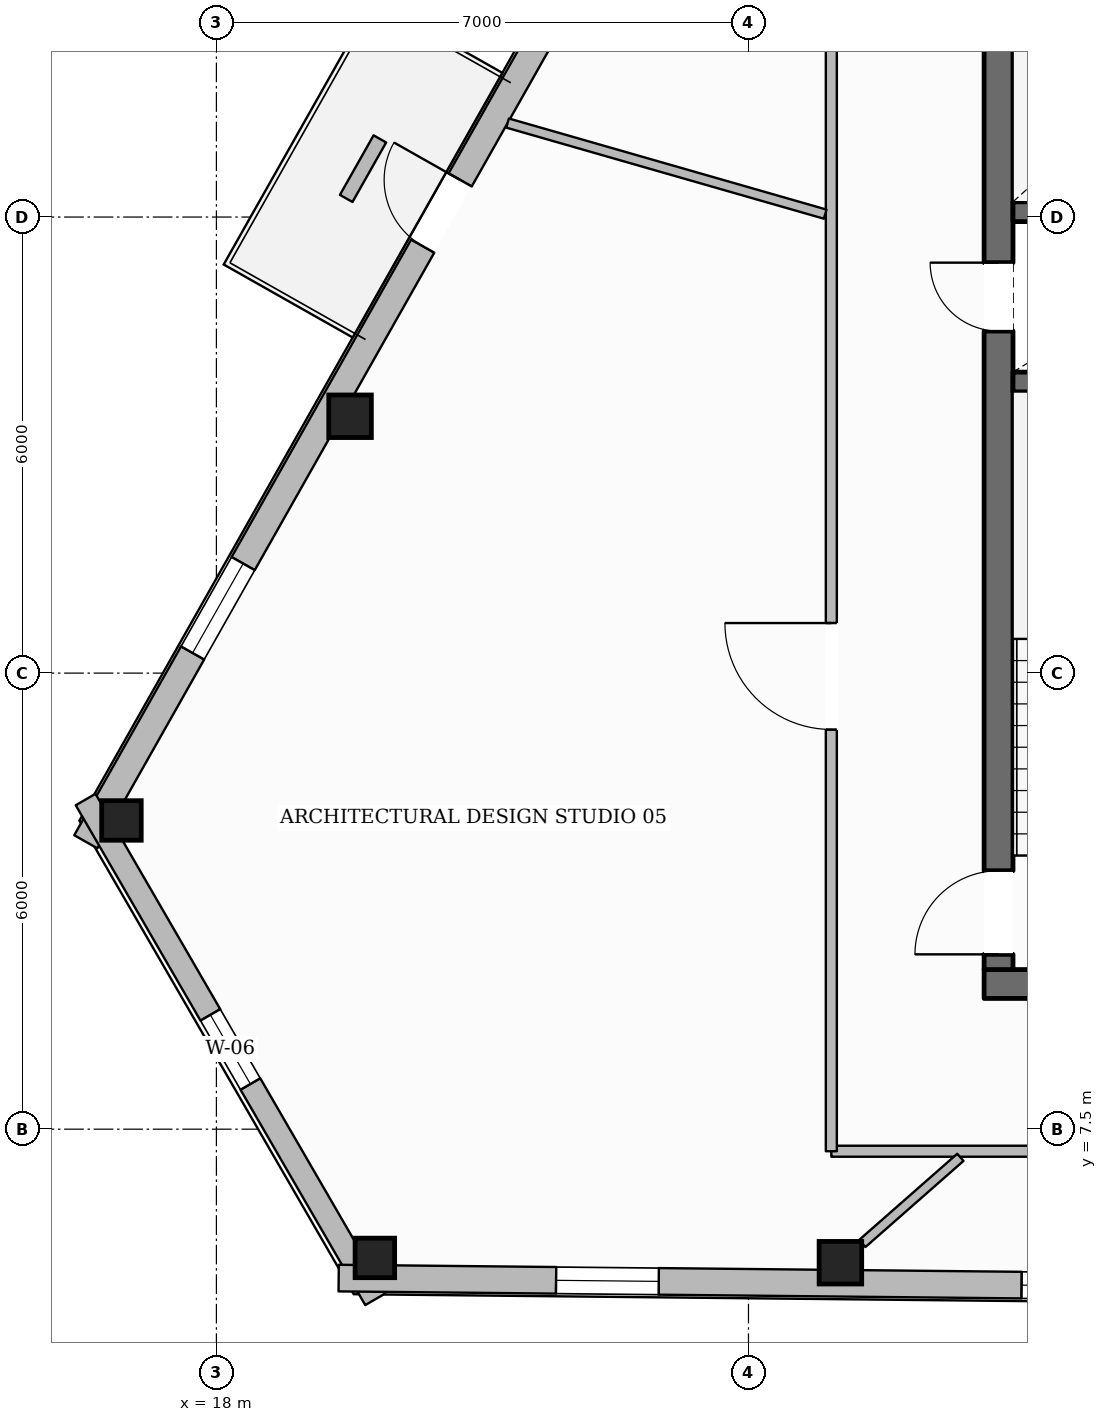
"""IFC4 building model, lengths in metres.
Left out: names, types, materials, properties, quantities, classifications, styles, units other than length and angle.
Written with IfcOpenShell. Run it as: python <this file> out.ifc"""

import sys

from ifc_helpers import new_model, si_unit, direction, frame, frame_2d, origin, origin_2d, place, context, subcontext, project, spatial, rectangle, hollow_rectangle, extrude, element, fill, save


model = new_model("IFC4")
c1 = context("Model", 3, precision=1e-05, world=origin(), true_north=direction((0.0, 1.0)))
c2 = subcontext(c1, "Body", "Model", "MODEL_VIEW")
j1 = project(units=[si_unit("LENGTHUNIT", "METRE"), si_unit("PLANEANGLEUNIT", "RADIAN")], contexts=[c1])
p1 = place(None, origin())
s1 = spatial("IfcSite", under=j1, at=p1, CompositionType="ELEMENT")
p2 = place(p1, origin())
s2 = spatial("IfcBuilding", under=s1, at=p2, CompositionType="ELEMENT")
p3 = place(p2, frame((0.0, 0.0, 247.2)))
s3 = spatial("IfcBuildingStorey", under=s2, at=p3, CompositionType="ELEMENT", Elevation=247.2)
p4 = place(p3, frame((28.1, 9.41, 0.0), z_axis=(0.0, 0.0, 1.0), x_axis=(1.0, 0.0, 0.0)))
e1 = element("IfcWall", 1, at=p4, inside=s3, PredefinedType="SOLIDWALL", context=c2, shape_type="SweptSolid", body=[
    extrude(rectangle(XDim=19.8, YDim=0.38, at=frame_2d((9.9, 0.0))), origin(), (0.0, 0.0, 1.0), 3.61),
])
p5 = place(p4, frame((10.4, 0.0, 0.0)))
e2 = element("IfcOpeningElement", 2, at=p5, cuts=e1, PredefinedType="OPENING", context=c2, shape_type="SweptSolid", body=[
    extrude(rectangle(XDim=1.4, YDim=2.2, at=frame_2d((0.7, 1.1))), frame((0.0, 0.2, 0.0), z_axis=(0.0, -1.0, 0.0), x_axis=(1.0, 0.0, 0.0)), (0.0, 0.0, 1.0), 0.4),
])
p6 = place(p3, frame((28.29, 9.6, 0.0), z_axis=(0.0, 0.0, 1.0), x_axis=(0.0, 1.0, 0.0)))
e3 = element("IfcWall", 3, at=p6, inside=s3, PredefinedType="SOLIDWALL", context=c2, shape_type="SweptSolid", body=[
    extrude(rectangle(XDim=13.0, YDim=0.38, at=frame_2d((6.5, 0.0))), origin(), (0.0, 0.0, 1.0), 3.61),
])
p7 = place(p6, frame((0.2, 0.0, 0.0)))
e4 = element("IfcOpeningElement", 4, at=p7, cuts=e3, PredefinedType="OPENING", context=c2, shape_type="SweptSolid", body=[
    extrude(rectangle(XDim=1.1, YDim=2.15, at=frame_2d((0.55, 1.075))), frame((0.0, 0.2, 0.0), z_axis=(0.0, -1.0, 0.0), x_axis=(1.0, 0.0, 0.0)), (0.0, 0.0, 1.0), 0.4),
])
p8 = place(p6, frame((8.4, 0.0, 0.0)))
e5 = element("IfcOpeningElement", 5, at=p8, cuts=e3, PredefinedType="OPENING", context=c2, shape_type="SweptSolid", body=[
    extrude(rectangle(XDim=0.9, YDim=2.1, at=frame_2d((0.45, 1.05))), frame((0.0, 0.2, 0.0), z_axis=(0.0, -1.0, 0.0), x_axis=(1.0, 0.0, 0.0)), (0.0, 0.0, 1.0), 0.4),
])
for number, where, z_axis, x_axis in (
    (6, (28.48, 17.33, 0.0), (0.0, 0.0, 1.0), (1.0, 0.0, 0.0)),
    (7, (28.48, 19.57, 0.0), (0.0, 0.0, 1.0), (1.0, 0.0, 0.0)),
):
    element("IfcWall", number, at=place(p3, frame(where, z_axis=z_axis, x_axis=x_axis)), inside=s3, PredefinedType="SHEAR", context=c2, shape_type="SweptSolid", body=[
        extrude(rectangle(XDim=3.2, YDim=0.26, at=frame_2d((1.6, 0.0))), origin(), (0.0, 0.0, 1.0), 3.61),
    ])
p9 = place(p3, frame((19.758, 16.879, 0.0), z_axis=(0.0, 0.0, 1.0), x_axis=(1.0, 0.0, 0.0)))
e8 = element("IfcColumn", 8, at=p9, inside=s3, PredefinedType="COLUMN", context=c2, shape_type="SweptSolid", body=[
    extrude(hollow_rectangle(XDim=0.56, YDim=0.56, WallThickness=0.025, at=origin_2d()), origin(), (0.0, 0.0, 1.0), 3.61),
])
for number, where, z_axis, x_axis in (
    (9, (16.751, 11.562, 0.0), (0.0, 0.0, 1.0), (1.0, 0.0, 0.0)),
    (10, (20.085, 5.806, 0.0), (0.0, 0.0, 1.0), (1.0, 0.0, 0.0)),
):
    element("IfcColumn", number, at=place(p3, frame(where, z_axis=z_axis, x_axis=x_axis)), inside=s3, PredefinedType="COLUMN", context=c2, shape_type="SweptSolid", body=[
        extrude(hollow_rectangle(XDim=0.52, YDim=0.52, WallThickness=0.024, at=origin_2d()), origin(), (0.0, 0.0, 1.0), 3.61),
    ])
p10 = place(p3, frame((26.209, 5.743, 0.0), z_axis=(0.0, 0.0, 1.0), x_axis=(1.0, 0.0, 0.0)))
e11 = element("IfcColumn", 11, at=p10, inside=s3, PredefinedType="COLUMN", context=c2, shape_type="SweptSolid", body=[
    extrude(hollow_rectangle(XDim=0.56, YDim=0.56, WallThickness=0.025, at=origin_2d()), origin(), (0.0, 0.0, 1.0), 3.61),
])
p11 = place(p3, frame((16.282, 11.281, 0.0), z_axis=(0.0, 0.0, 1.0), x_axis=(0.492304911919, 0.870422813178, 0.0)))
e12 = element("IfcWall", 12, at=p11, inside=s3, PredefinedType="STANDARD", context=c2, shape_type="SweptSolid", body=[
    extrude(rectangle(XDim=37.613, YDim=0.35, at=frame_2d((18.807, 0.0))), origin(), (0.0, 0.0, 1.0), 3.196),
])
p12 = place(p11, frame((9.003, 0.0, 0.0)))
e13 = element("IfcOpeningElement", 13, at=p12, cuts=e12, PredefinedType="OPENING", context=c2, shape_type="SweptSolid", body=[
    extrude(rectangle(XDim=1.0, YDim=2.2, at=frame_2d((0.5, 1.1))), frame((0.0, 0.185, 0.0), z_axis=(0.0, -1.0, 0.0), x_axis=(1.0, 0.0, 0.0)), (0.0, 0.0, 1.0), 0.37),
])
p13 = place(p11, frame((33.4, 0.0, 0.65)))
e14 = element("IfcOpeningElement", 14, at=p13, cuts=e12, PredefinedType="OPENING", context=c2, shape_type="SweptSolid", body=[
    extrude(rectangle(XDim=1.35, YDim=1.75, at=frame_2d((0.675, 0.875))), frame((0.0, 0.185, 0.0), z_axis=(0.0, -1.0, 0.0), x_axis=(1.0, 0.0, 0.0)), (0.0, 0.0, 1.0), 0.37),
])
p14 = place(p11, frame((27.291, 0.0, 0.65)))
e15 = element("IfcOpeningElement", 15, at=p14, cuts=e12, PredefinedType="OPENING", context=c2, shape_type="SweptSolid", body=[
    extrude(rectangle(XDim=1.35, YDim=1.75, at=frame_2d((0.675, 0.875))), frame((0.0, 0.185, 0.0), z_axis=(0.0, -1.0, 0.0), x_axis=(1.0, 0.0, 0.0)), (0.0, 0.0, 1.0), 0.37),
])
p15 = place(p11, frame((21.182, 0.0, 0.65)))
e16 = element("IfcOpeningElement", 16, at=p15, cuts=e12, PredefinedType="OPENING", context=c2, shape_type="SweptSolid", body=[
    extrude(rectangle(XDim=1.35, YDim=1.75, at=frame_2d((0.675, 0.875))), frame((0.0, 0.185, 0.0), z_axis=(0.0, -1.0, 0.0), x_axis=(1.0, 0.0, 0.0)), (0.0, 0.0, 1.0), 0.37),
])
p16 = place(p11, frame((2.854, 0.0, 0.65)))
e17 = element("IfcOpeningElement", 17, at=p16, cuts=e12, PredefinedType="OPENING", context=c2, shape_type="SweptSolid", body=[
    extrude(rectangle(XDim=1.35, YDim=1.75, at=frame_2d((0.675, 0.875))), frame((0.0, 0.185, 0.0), z_axis=(0.0, -1.0, 0.0), x_axis=(1.0, 0.0, 0.0)), (0.0, 0.0, 1.0), 0.37),
])
p17 = place(p3, frame((20.088, 5.261, 0.0), z_axis=(0.0, 0.0, 1.0), x_axis=(-0.501243947879, 0.865306017958, 0.0)))
e18 = element("IfcWall", 18, at=p17, inside=s3, PredefinedType="STANDARD", context=c2, shape_type="SweptSolid", body=[
    extrude(rectangle(XDim=7.599, YDim=0.3, at=frame_2d((3.8, 0.0))), origin(), (0.0, 0.0, 1.0), 3.196),
])
p18 = place(p17, frame((3.275, 0.0, 0.65)))
e19 = element("IfcOpeningElement", 19, at=p18, cuts=e18, PredefinedType="OPENING", context=c2, shape_type="SweptSolid", body=[
    extrude(rectangle(XDim=1.05, YDim=1.7, at=frame_2d((0.525, 0.85))), frame((0.0, 0.16, 0.0), z_axis=(0.0, -1.0, 0.0), x_axis=(1.0, 0.0, 0.0)), (0.0, 0.0, 1.0), 0.32),
])
p19 = place(p3, frame((57.314, 5.153, 0.0), z_axis=(0.0, 0.0, 1.0), x_axis=(-0.999946942722, 0.010301055321, 0.0)))
e20 = element("IfcWall", 20, at=p19, inside=s3, PredefinedType="STANDARD", context=c2, shape_type="SweptSolid", body=[
    extrude(rectangle(XDim=37.708, YDim=0.35, at=frame_2d((18.854, 0.0))), origin(), (0.0, 0.0, 1.0), 3.196),
])
p20 = place(p19, frame((33.497, 0.0, 0.65)))
e21 = element("IfcOpeningElement", 21, at=p20, cuts=e20, PredefinedType="OPENING", context=c2, shape_type="SweptSolid", body=[
    extrude(rectangle(XDim=1.35, YDim=1.75, at=frame_2d((0.675, 0.875))), frame((0.0, 0.185, 0.0), z_axis=(0.0, -1.0, 0.0), x_axis=(1.0, 0.0, 0.0)), (0.0, 0.0, 1.0), 0.37),
])
p21 = place(p19, frame((27.372, 0.0, 0.65)))
e22 = element("IfcOpeningElement", 22, at=p21, cuts=e20, PredefinedType="OPENING", context=c2, shape_type="SweptSolid", body=[
    extrude(rectangle(XDim=1.35, YDim=1.75, at=frame_2d((0.675, 0.875))), frame((0.0, 0.185, 0.0), z_axis=(0.0, -1.0, 0.0), x_axis=(1.0, 0.0, 0.0)), (0.0, 0.0, 1.0), 0.37),
])
p22 = place(p19, frame((21.246, 0.0, 0.65)))
e23 = element("IfcOpeningElement", 23, at=p22, cuts=e20, PredefinedType="OPENING", context=c2, shape_type="SweptSolid", body=[
    extrude(rectangle(XDim=1.35, YDim=1.75, at=frame_2d((0.675, 0.875))), frame((0.0, 0.185, 0.0), z_axis=(0.0, -1.0, 0.0), x_axis=(1.0, 0.0, 0.0)), (0.0, 0.0, 1.0), 0.37),
])
p23 = place(p19, frame((8.996, 0.0, 0.65)))
e24 = element("IfcOpeningElement", 24, at=p23, cuts=e20, PredefinedType="OPENING", context=c2, shape_type="SweptSolid", body=[
    extrude(rectangle(XDim=1.35, YDim=1.75, at=frame_2d((0.675, 0.875))), frame((0.0, 0.185, 0.0), z_axis=(0.0, -1.0, 0.0), x_axis=(1.0, 0.0, 0.0)), (0.0, 0.0, 1.0), 0.37),
])
p24 = place(p19, frame((2.871, 0.0, 0.65)))
e25 = element("IfcOpeningElement", 25, at=p24, cuts=e20, PredefinedType="OPENING", context=c2, shape_type="SweptSolid", body=[
    extrude(rectangle(XDim=1.35, YDim=1.75, at=frame_2d((0.675, 0.875))), frame((0.0, 0.185, 0.0), z_axis=(0.0, -1.0, 0.0), x_axis=(1.0, 0.0, 0.0)), (0.0, 0.0, 1.0), 0.37),
])
p25 = place(p3, frame((20.151, 20.528, 0.0), z_axis=(0.0, 0.0, 1.0), x_axis=(-0.492423750739, -0.870355588083, 0.0)))
e26 = element("IfcWall", 26, at=p25, inside=s3, PredefinedType="USERDEFINED", context=c2, shape_type="SweptSolid", body=[
    extrude(rectangle(XDim=0.9, YDim=0.19, at=frame_2d((0.45, 0.0))), origin(), (0.0, 0.0, 1.0), 0.5),
])
p26 = place(p3, frame((49.91, 7.21, 0.0), z_axis=(0.0, 0.0, 1.0), x_axis=(-1.0, 0.0, 0.0)))
e27 = element("IfcWall", 27, at=p26, inside=s3, PredefinedType="PARTITIONING", context=c2, shape_type="SweptSolid", body=[
    extrude(rectangle(XDim=23.82, YDim=0.145, at=frame_2d((11.91, 0.0))), origin(), (0.0, 0.0, 1.0), 3.61),
])
p27 = place(p26, frame((10.606, 0.0, 0.0)))
e28 = element("IfcOpeningElement", 28, at=p27, cuts=e27, PredefinedType="OPENING", context=c2, shape_type="SweptSolid", body=[
    extrude(rectangle(XDim=0.98, YDim=2.15, at=frame_2d((0.49, 1.075))), frame((0.0, 0.083, 0.0), z_axis=(0.0, -1.0, 0.0), x_axis=(1.0, 0.0, 0.0)), (0.0, 0.0, 1.0), 0.165),
])
p28 = place(p3, frame((26.09, 7.21, 0.0), z_axis=(0.0, 0.0, 1.0), x_axis=(0.0, 1.0, 0.0)))
e29 = element("IfcWall", 29, at=p28, inside=s3, PredefinedType="PARTITIONING", context=c2, shape_type="SweptSolid", body=[
    extrude(rectangle(XDim=17.78, YDim=0.145, at=frame_2d((8.89, 0.0))), origin(), (0.0, 0.0, 1.0), 3.349),
])
p29 = place(p28, frame((5.549, 0.0, 0.0)))
e30 = element("IfcOpeningElement", 30, at=p29, cuts=e29, PredefinedType="OPENING", context=c2, shape_type="SweptSolid", body=[
    extrude(rectangle(XDim=1.4, YDim=2.2, at=frame_2d((0.7, 1.1))), frame((0.0, 0.083, 0.0), z_axis=(0.0, -1.0, 0.0), x_axis=(1.0, 0.0, 0.0)), (0.0, 0.0, 1.0), 0.165),
])
p30 = place(p3, frame((26.01, 19.538, 0.0), z_axis=(0.0, 0.0, 1.0), x_axis=(-0.961260714154, 0.275640779684, 0.0)))
e31 = element("IfcWall", 31, at=p30, inside=s3, PredefinedType="PARTITIONING", context=c2, shape_type="SweptSolid", body=[
    extrude(rectangle(XDim=4.347, YDim=0.125, at=frame_2d((2.174, 0.0))), origin(), (0.0, 0.0, 1.0), 3.61),
])
p31 = place(p3, frame((27.788, 7.129, 0.0), z_axis=(0.0, 0.0, 1.0), x_axis=(-0.751333628503, -0.659922555063, 0.0)))
e32 = element("IfcWall", 32, at=p31, inside=s3, PredefinedType="PARTITIONING", context=c2, shape_type="SweptSolid", body=[
    extrude(rectangle(XDim=1.717, YDim=0.125, at=frame_2d((0.859, 0.0))), origin(), (0.0, 0.0, 1.0), 3.61),
])
p32 = place(p12, origin())
e33 = element("IfcDoor", 33, at=p32, inside=s3, OperationType="SINGLE_SWING_RIGHT", PredefinedType="DOOR", context=c2, shape_type="SweptSolid", body=[
    extrude(rectangle(XDim=1.0, YDim=2.2, at=frame_2d((0.5, 1.1))), frame((0.0, 0.025, 0.0), z_axis=(0.0, -1.0, 0.0), x_axis=(1.0, 0.0, 0.0)), (0.0, 0.0, 1.0), 0.05),
])
fill(e13, e33)
p33 = place(p16, origin())
e34 = element("IfcWindow", 34, at=p33, inside=s3, PartitioningType="SINGLE_PANEL", PredefinedType="WINDOW", context=c2, shape_type="SweptSolid", body=[
    extrude(rectangle(XDim=1.35, YDim=1.75, at=frame_2d((0.675, 0.875))), frame((0.0, 0.03, 0.0), z_axis=(0.0, -1.0, 0.0), x_axis=(1.0, 0.0, 0.0)), (0.0, 0.0, 1.0), 0.06),
])
fill(e17, e34)
p34 = place(p20, origin())
e35 = element("IfcWindow", 35, at=p34, inside=s3, PartitioningType="SINGLE_PANEL", PredefinedType="WINDOW", context=c2, shape_type="SweptSolid", body=[
    extrude(rectangle(XDim=1.35, YDim=1.75, at=frame_2d((0.675, 0.875))), frame((0.0, 0.03, 0.0), z_axis=(0.0, -1.0, 0.0), x_axis=(1.0, 0.0, 0.0)), (0.0, 0.0, 1.0), 0.06),
])
fill(e21, e35)
p35 = place(p21, origin())
e36 = element("IfcWindow", 36, at=p35, inside=s3, PartitioningType="SINGLE_PANEL", PredefinedType="WINDOW", context=c2, shape_type="SweptSolid", body=[
    extrude(rectangle(XDim=1.35, YDim=1.75, at=frame_2d((0.675, 0.875))), frame((0.0, 0.03, 0.0), z_axis=(0.0, -1.0, 0.0), x_axis=(1.0, 0.0, 0.0)), (0.0, 0.0, 1.0), 0.06),
])
fill(e22, e36)
p36 = place(p18, origin())
e37 = element("IfcWindow", 37, at=p36, inside=s3, PartitioningType="SINGLE_PANEL", PredefinedType="WINDOW", context=c2, shape_type="SweptSolid", body=[
    extrude(rectangle(XDim=1.05, YDim=1.7, at=frame_2d((0.525, 0.85))), frame((0.0, 0.03, 0.0), z_axis=(0.0, -1.0, 0.0), x_axis=(1.0, 0.0, 0.0)), (0.0, 0.0, 1.0), 0.06),
])
fill(e19, e37)
p37 = place(p7, origin())
e38 = element("IfcDoor", 38, at=p37, inside=s3, OperationType="SINGLE_SWING_LEFT", PredefinedType="DOOR", context=c2, shape_type="SweptSolid", body=[
    extrude(rectangle(XDim=1.1, YDim=2.15, at=frame_2d((0.55, 1.075))), frame((0.0, 0.025, 0.0), z_axis=(0.0, -1.0, 0.0), x_axis=(1.0, 0.0, 0.0)), (0.0, 0.0, 1.0), 0.05),
])
fill(e4, e38)
p38 = place(p8, origin())
e39 = element("IfcDoor", 39, at=p38, inside=s3, OperationType="SINGLE_SWING_RIGHT", PredefinedType="DOOR", context=c2, shape_type="SweptSolid", body=[
    extrude(rectangle(XDim=0.9, YDim=2.1, at=frame_2d((0.45, 1.05))), frame((0.0, 0.025, 0.0), z_axis=(0.0, -1.0, 0.0), x_axis=(1.0, 0.0, 0.0)), (0.0, 0.0, 1.0), 0.05),
])
fill(e5, e39)
p39 = place(p29, origin())
e40 = element("IfcDoor", 40, at=p39, inside=s3, OperationType="SINGLE_SWING_RIGHT", PredefinedType="DOOR", context=c2, shape_type="SweptSolid", body=[
    extrude(rectangle(XDim=1.4, YDim=2.2, at=frame_2d((0.7, 1.1))), frame((0.0, 0.025, 0.0), z_axis=(0.0, -1.0, 0.0), x_axis=(1.0, 0.0, 0.0)), (0.0, 0.0, 1.0), 0.05),
])
fill(e30, e40)
save(model, sys.argv[1])
